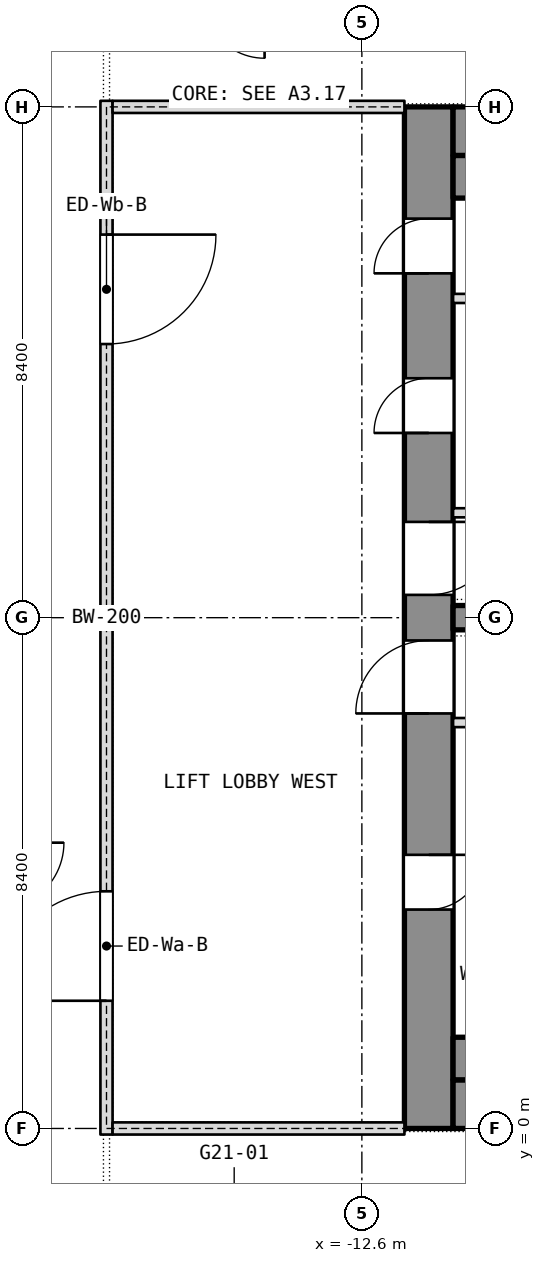
"""IFC4 building model, lengths in metres.
Left out: names, types, materials, properties, quantities, classifications, styles, units other than length and angle.
Written with IfcOpenShell. Run it as: python <this file> out.ifc"""

import sys

from ifc_helpers import new_model, si_unit, direction, frame, frame_2d, origin, place, context, subcontext, project, spatial, rectangle, extrude, element, fill, save


model = new_model("IFC4")
c1 = context("Model", 3, precision=1e-05, world=origin(), true_north=direction((0.0, 1.0)))
c2 = subcontext(c1, "Body", "Model", "MODEL_VIEW")
j1 = project(units=[si_unit("LENGTHUNIT", "METRE"), si_unit("PLANEANGLEUNIT", "RADIAN")], contexts=[c1])
p1 = place(None, origin())
s1 = spatial("IfcSite", under=j1, at=p1, CompositionType="ELEMENT")
p2 = place(p1, origin())
s2 = spatial("IfcBuilding", under=s1, at=p2, CompositionType="ELEMENT")
p3 = place(p2, frame((0.0, 0.0, 245.3)))
s3 = spatial("IfcBuildingStorey", under=s2, at=p3, CompositionType="ELEMENT", Elevation=245.3)
p4 = place(p3, frame((-11.5, 0.0, 0.0), z_axis=(0.0, 0.0, 1.0), x_axis=(0.0, 1.0, 0.0)))
e1 = element("IfcWall", 1, at=p4, inside=s3, PredefinedType="SHEAR", context=c2, shape_type="SweptSolid", body=[
    extrude(rectangle(XDim=16.8, YDim=0.8, at=frame_2d((8.4, 0.0))), origin(), (0.0, 0.0, 1.0), 3.6),
])
p5 = place(p4, frame((3.6, 0.0, 0.0)))
e2 = element("IfcOpeningElement", 2, at=p5, cuts=e1, PredefinedType="OPENING", context=c2, shape_type="SweptSolid", body=[
    extrude(rectangle(XDim=0.9, YDim=2.1, at=frame_2d((0.45, 1.05))), frame((0.0, 0.4, 0.0), z_axis=(0.0, -1.0, 0.0), x_axis=(1.0, 0.0, 0.0)), (0.0, 0.0, 1.0), 0.8),
])
p6 = place(p4, frame((6.825, 0.0, 0.0)))
e3 = element("IfcOpeningElement", 3, at=p6, cuts=e1, PredefinedType="OPENING", context=c2, shape_type="SweptSolid", body=[
    extrude(rectangle(XDim=1.2, YDim=2.1, at=frame_2d((0.6, 1.05))), frame((0.0, 0.4, 0.0), z_axis=(0.0, -1.0, 0.0), x_axis=(1.0, 0.0, 0.0)), (0.0, 0.0, 1.0), 0.8),
])
p7 = place(p4, frame((14.062, 0.0, 0.0)))
e4 = element("IfcOpeningElement", 4, at=p7, cuts=e1, PredefinedType="OPENING", context=c2, shape_type="SweptSolid", body=[
    extrude(rectangle(XDim=0.9, YDim=2.1, at=frame_2d((0.45, 1.05))), frame((0.0, 0.4, 0.0), z_axis=(0.0, -1.0, 0.0), x_axis=(1.0, 0.0, 0.0)), (0.0, 0.0, 1.0), 0.8),
])
p8 = place(p4, frame((11.438, 0.0, 0.0)))
e5 = element("IfcOpeningElement", 5, at=p8, cuts=e1, PredefinedType="OPENING", context=c2, shape_type="SweptSolid", body=[
    extrude(rectangle(XDim=0.9, YDim=2.1, at=frame_2d((0.45, 1.05))), frame((0.0, 0.4, 0.0), z_axis=(0.0, -1.0, 0.0), x_axis=(1.0, 0.0, 0.0)), (0.0, 0.0, 1.0), 0.8),
])
p9 = place(p4, frame((8.775, 0.0, 0.0)))
e6 = element("IfcOpeningElement", 6, at=p9, cuts=e1, PredefinedType="OPENING", context=c2, shape_type="SweptSolid", body=[
    extrude(rectangle(XDim=1.2, YDim=2.1, at=frame_2d((0.6, 1.05))), frame((0.0, 0.4, 0.0), z_axis=(0.0, -1.0, 0.0), x_axis=(1.0, 0.0, 0.0)), (0.0, 0.0, 1.0), 0.8),
])
for number, where, z_axis, x_axis in (
    (7, (-11.1, 0.4, 0.0), (0.0, 0.0, 1.0), (1.0, 0.0, 0.0)),
    (8, (-11.1, 16.4, 0.0), (0.0, 0.0, 1.0), (1.0, 0.0, 0.0)),
):
    element("IfcWall", number, at=place(p3, frame(where, z_axis=z_axis, x_axis=x_axis)), inside=s3, PredefinedType="SHEAR", context=c2, shape_type="SweptSolid", body=[
        extrude(rectangle(XDim=22.2, YDim=0.8, at=frame_2d((11.1, 0.0))), origin(), (0.0, 0.0, 1.0), 3.6),
    ])
p10 = place(p3, frame((-11.1, 8.4, 0.0), z_axis=(0.0, 0.0, 1.0), x_axis=(1.0, 0.0, 0.0)))
e9 = element("IfcWall", 9, at=p10, inside=s3, PredefinedType="SHEAR", context=c2, shape_type="SweptSolid", body=[
    extrude(rectangle(XDim=6.7, YDim=0.4, at=frame_2d((3.35, 0.0))), origin(), (0.0, 0.0, 1.0), 3.6),
])
for number, where, z_axis, x_axis in (
    (10, (-11.1, 1.15, 0.0), (0.0, 0.0, 1.0), (1.0, 0.0, 0.0)),
    (11, (-11.1, 15.65, 0.0), (0.0, 0.0, 1.0), (1.0, 0.0, 0.0)),
):
    element("IfcWall", number, at=place(p3, frame(where, z_axis=z_axis, x_axis=x_axis)), inside=s3, PredefinedType="PARTITIONING", context=c2, shape_type="SweptSolid", body=[
        extrude(rectangle(XDim=22.2, YDim=0.7, at=frame_2d((11.1, 0.0))), origin(), (0.0, 0.0, 1.0), 3.34),
    ])
for number, where, z_axis, x_axis in (
    (12, (-11.1, 6.675, 0.0), (0.0, 0.0, 1.0), (1.0, 0.0, 0.0)),
    (13, (-11.1, 10.125, 0.0), (0.0, 0.0, 1.0), (1.0, 0.0, 0.0)),
    (14, (-11.1, 13.65, 0.0), (0.0, 0.0, 1.0), (1.0, 0.0, 0.0)),
):
    element("IfcWall", number, at=place(p3, frame(where, z_axis=z_axis, x_axis=x_axis)), inside=s3, PredefinedType="PARTITIONING", context=c2, shape_type="SweptSolid", body=[
        extrude(rectangle(XDim=2.1, YDim=0.15, at=frame_2d((1.05, 0.0))), origin(), (0.0, 0.0, 1.0), 3.34),
    ])
p11 = place(p3, frame((-16.8, -0.1, 0.0), z_axis=(0.0, 0.0, 1.0), x_axis=(0.0, 1.0, 0.0)))
e15 = element("IfcWall", 15, at=p11, inside=s3, PredefinedType="PARTITIONING", context=c2, shape_type="SweptSolid", body=[
    extrude(rectangle(XDim=17.0, YDim=0.2, at=frame_2d((8.5, 0.0))), origin(), (0.0, 0.0, 1.0), 3.34),
])
p12 = place(p11, frame((2.2, 0.0, 0.0)))
e16 = element("IfcOpeningElement", 16, at=p12, cuts=e15, PredefinedType="OPENING", context=c2, shape_type="SweptSolid", body=[
    extrude(rectangle(XDim=1.8, YDim=2.1, at=frame_2d((0.9, 1.05))), frame((0.0, 0.1, 0.0), z_axis=(0.0, -1.0, 0.0), x_axis=(1.0, 0.0, 0.0)), (0.0, 0.0, 1.0), 0.2),
])
p13 = place(p11, frame((13.0, 0.0, 0.0)))
e17 = element("IfcOpeningElement", 17, at=p13, cuts=e15, PredefinedType="OPENING", context=c2, shape_type="SweptSolid", body=[
    extrude(rectangle(XDim=1.8, YDim=2.1, at=frame_2d((0.9, 1.05))), frame((0.0, 0.1, 0.0), z_axis=(0.0, -1.0, 0.0), x_axis=(1.0, 0.0, 0.0)), (0.0, 0.0, 1.0), 0.2),
])
for number, where, z_axis, x_axis in (
    (18, (-16.7, 0.0, 0.0), (0.0, 0.0, 1.0), (1.0, 0.0, 0.0)),
    (19, (-16.7, 16.8, 0.0), (0.0, 0.0, 1.0), (1.0, 0.0, 0.0)),
):
    element("IfcWall", number, at=place(p3, frame(where, z_axis=z_axis, x_axis=x_axis)), inside=s3, PredefinedType="PARTITIONING", context=c2, shape_type="SweptSolid", body=[
        extrude(rectangle(XDim=4.8, YDim=0.2, at=frame_2d((2.4, 0.0))), origin(), (0.0, 0.0, 1.0), 2.94),
    ])
p14 = place(p5, origin())
e20 = element("IfcDoor", 20, at=p14, inside=s3, OperationType="SINGLE_SWING_LEFT", PredefinedType="DOOR", context=c2, shape_type="SweptSolid", body=[
    extrude(rectangle(XDim=0.9, YDim=2.1, at=frame_2d((0.45, 1.05))), frame((0.0, 0.025, 0.0), z_axis=(0.0, -1.0, 0.0), x_axis=(1.0, 0.0, 0.0)), (0.0, 0.0, 1.0), 0.05),
])
fill(e2, e20)
p15 = place(p6, origin())
e21 = element("IfcDoor", 21, at=p15, inside=s3, OperationType="SINGLE_SWING_LEFT", PredefinedType="DOOR", context=c2, shape_type="SweptSolid", body=[
    extrude(rectangle(XDim=1.2, YDim=2.1, at=frame_2d((0.6, 1.05))), frame((0.0, 0.025, 0.0), z_axis=(0.0, -1.0, 0.0), x_axis=(1.0, 0.0, 0.0)), (0.0, 0.0, 1.0), 0.05),
])
fill(e3, e21)
p16 = place(p7, origin())
e22 = element("IfcDoor", 22, at=p16, inside=s3, OperationType="SINGLE_SWING_LEFT", PredefinedType="DOOR", context=c2, shape_type="SweptSolid", body=[
    extrude(rectangle(XDim=0.9, YDim=2.1, at=frame_2d((0.45, 1.05))), frame((0.0, 0.025, 0.0), z_axis=(0.0, -1.0, 0.0), x_axis=(1.0, 0.0, 0.0)), (0.0, 0.0, 1.0), 0.05),
])
fill(e4, e22)
p17 = place(p8, origin())
e23 = element("IfcDoor", 23, at=p17, inside=s3, OperationType="SINGLE_SWING_LEFT", PredefinedType="DOOR", context=c2, shape_type="SweptSolid", body=[
    extrude(rectangle(XDim=0.9, YDim=2.1, at=frame_2d((0.45, 1.05))), frame((0.0, 0.025, 0.0), z_axis=(0.0, -1.0, 0.0), x_axis=(1.0, 0.0, 0.0)), (0.0, 0.0, 1.0), 0.05),
])
fill(e5, e23)
p18 = place(p9, origin())
e24 = element("IfcDoor", 24, at=p18, inside=s3, OperationType="SINGLE_SWING_LEFT", PredefinedType="DOOR", context=c2, shape_type="SweptSolid", body=[
    extrude(rectangle(XDim=1.2, YDim=2.1, at=frame_2d((0.6, 1.05))), frame((0.0, 0.025, 0.0), z_axis=(0.0, -1.0, 0.0), x_axis=(1.0, 0.0, 0.0)), (0.0, 0.0, 1.0), 0.05),
])
fill(e6, e24)
p19 = place(p12, origin())
e25 = element("IfcDoor", 25, at=p19, inside=s3, OperationType="DOUBLE_DOOR_SINGLE_SWING", PredefinedType="DOOR", context=c2, shape_type="SweptSolid", body=[
    extrude(rectangle(XDim=1.8, YDim=2.1, at=frame_2d((0.9, 1.05))), frame((0.0, 0.025, 0.0), z_axis=(0.0, -1.0, 0.0), x_axis=(1.0, 0.0, 0.0)), (0.0, 0.0, 1.0), 0.05),
])
fill(e16, e25)
p20 = place(p13, origin())
e26 = element("IfcDoor", 26, at=p20, inside=s3, OperationType="DOUBLE_DOOR_SINGLE_SWING", PredefinedType="DOOR", context=c2, shape_type="SweptSolid", body=[
    extrude(rectangle(XDim=1.8, YDim=2.1, at=frame_2d((0.9, 1.05))), frame((0.0, 0.025, 0.0), z_axis=(0.0, -1.0, 0.0), x_axis=(1.0, 0.0, 0.0)), (0.0, 0.0, 1.0), 0.05),
])
fill(e17, e26)
save(model, sys.argv[1])
